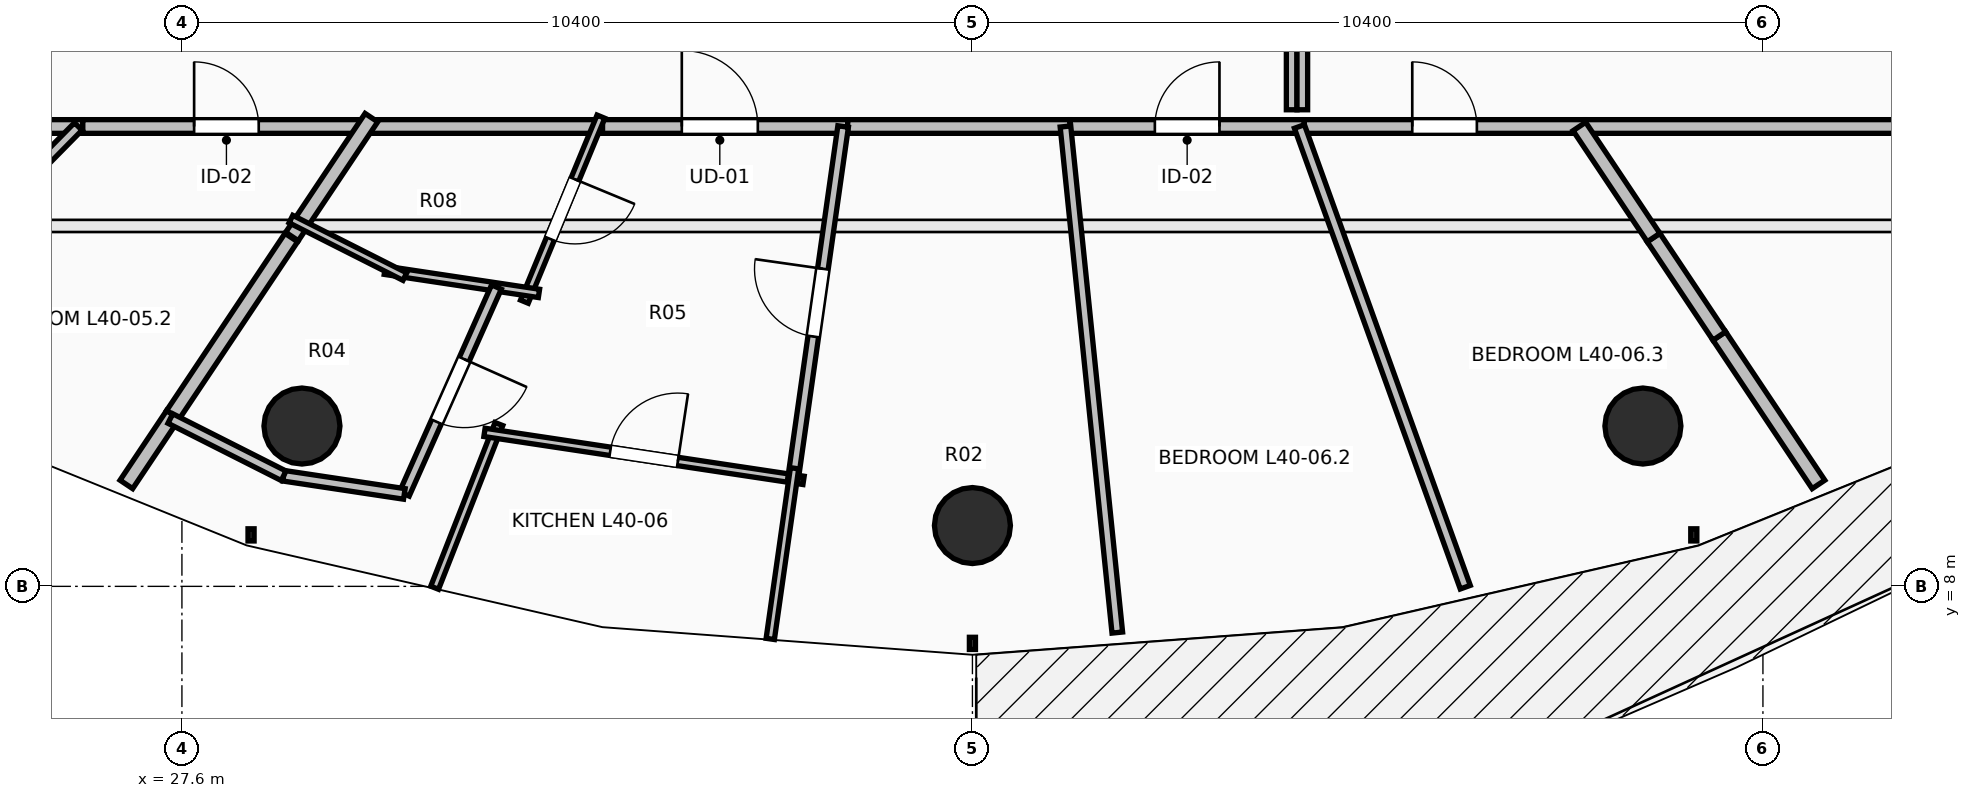
"""IFC4 building model, lengths in metres.
Left out: names, types, materials, properties, quantities, classifications, styles, units other than length and angle.
Written with IfcOpenShell. Run it as: python <this file> out.ifc"""

import sys

from ifc_helpers import new_model, si_unit, direction, frame, frame_2d, origin, origin_2d, place, context, subcontext, project, spatial, rectangle, circle, extrude, element, fill, save


model = new_model("IFC4")
c1 = context("Model", 3, precision=1e-05, world=origin(), true_north=direction((0.0, 1.0)))
c2 = subcontext(c1, "Body", "Model", "MODEL_VIEW")
j1 = project(units=[si_unit("LENGTHUNIT", "METRE"), si_unit("PLANEANGLEUNIT", "RADIAN")], contexts=[c1])
p1 = place(None, origin())
s1 = spatial("IfcSite", under=j1, at=p1, CompositionType="ELEMENT")
p2 = place(p1, origin())
s2 = spatial("IfcBuilding", under=s1, at=p2, CompositionType="ELEMENT")
p3 = place(p2, frame((0.0, 0.0, 150.1)))
s3 = spatial("IfcBuildingStorey", under=s2, at=p3, CompositionType="ELEMENT", Elevation=150.1)
for number, where, z_axis, x_axis in (
    (1, (29.179, 10.109, 0.0), (0.0, 0.0, 1.0), (-0.383, -0.924, 0.0)),
    (2, (38.0, 8.8, 0.0), (0.0, 0.0, 1.0), (0.0, -1.0, 0.0)),
    (3, (46.821, 10.109, 0.0), (0.0, 0.0, 1.0), (0.383, -0.924, 0.0)),
):
    element("IfcColumn", number, at=place(p3, frame(where, z_axis=z_axis, x_axis=x_axis)), inside=s3, PredefinedType="COLUMN", context=c2, shape_type="SweptSolid", body=[
        extrude(circle(Radius=0.5, at=origin_2d()), origin(), (0.0, 0.0, 1.0), 3.5),
    ])
p4 = place(p3, frame((25.2, 14.05, 0.0), z_axis=(0.0, 0.0, 1.0), x_axis=(1.0, 0.0, 0.0)))
e4 = element("IfcWall", 4, at=p4, inside=s3, PredefinedType="PARTITIONING", context=c2, shape_type="SweptSolid", body=[
    extrude(rectangle(XDim=1.096, YDim=0.18, at=frame_2d((0.548, 0.0))), origin(), (0.0, 0.0, 1.0), 2.972),
])
p5 = place(p3, frame((26.296, 14.05, 0.0), z_axis=(0.0, 0.0, 1.0), x_axis=(1.0, 0.0, 0.0)))
e5 = element("IfcWall", 5, at=p5, inside=s3, PredefinedType="PARTITIONING", context=c2, shape_type="SweptSolid", body=[
    extrude(rectangle(XDim=3.779, YDim=0.18, at=frame_2d((1.89, 0.0))), origin(), (0.0, 0.0, 1.0), 2.432),
])
p6 = place(p5, frame((1.465, 0.0, 0.0)))
e6 = element("IfcOpeningElement", 6, at=p6, cuts=e5, PredefinedType="OPENING", context=c2, shape_type="SweptSolid", body=[
    extrude(rectangle(XDim=0.85, YDim=2.1, at=frame_2d((0.425, 1.05))), frame((0.0, 0.105, 0.0), z_axis=(0.0, -1.0, 0.0), x_axis=(1.0, 0.0, 0.0)), (0.0, 0.0, 1.0), 0.21),
])
p7 = place(p3, frame((32.994, 14.05, 0.0), z_axis=(0.0, 0.0, 1.0), x_axis=(1.0, 0.0, 0.0)))
e7 = element("IfcWall", 7, at=p7, inside=s3, PredefinedType="PARTITIONING", context=c2, shape_type="SweptSolid", body=[
    extrude(rectangle(XDim=3.365, YDim=0.18, at=frame_2d((1.683, 0.0))), origin(), (0.0, 0.0, 1.0), 2.886),
])
p8 = place(p7, frame((1.183, 0.0, 0.0)))
e8 = element("IfcOpeningElement", 8, at=p8, cuts=e7, PredefinedType="OPENING", context=c2, shape_type="SweptSolid", body=[
    extrude(rectangle(XDim=1.0, YDim=2.15, at=frame_2d((0.5, 1.075))), frame((0.0, 0.105, 0.0), z_axis=(0.0, -1.0, 0.0), x_axis=(1.0, 0.0, 0.0)), (0.0, 0.0, 1.0), 0.21),
])
p9 = place(p3, frame((29.935, 14.05, 0.0), z_axis=(0.0, 0.0, 1.0), x_axis=(1.0, 0.0, 0.0)))
e9 = element("IfcWall", 9, at=p9, inside=s3, PredefinedType="PARTITIONING", context=c2, shape_type="SweptSolid", body=[
    extrude(rectangle(XDim=3.199, YDim=0.18, at=frame_2d((1.6, 0.0))), origin(), (0.0, 0.0, 1.0), 3.24),
])
p10 = place(p3, frame((36.359, 14.05, 0.0), z_axis=(0.0, 0.0, 1.0), x_axis=(1.0, 0.0, 0.0)))
e10 = element("IfcWall", 10, at=p10, inside=s3, PredefinedType="PARTITIONING", context=c2, shape_type="SweptSolid", body=[
    extrude(rectangle(XDim=2.925, YDim=0.18, at=frame_2d((1.462, 0.0))), origin(), (0.0, 0.0, 1.0), 2.886),
])
p11 = place(p3, frame((39.284, 14.05, 0.0), z_axis=(0.0, 0.0, 1.0), x_axis=(1.0, 0.0, 0.0)))
e11 = element("IfcWall", 11, at=p11, inside=s3, PredefinedType="PARTITIONING", context=c2, shape_type="SweptSolid", body=[
    extrude(rectangle(XDim=3.082, YDim=0.18, at=frame_2d((1.541, 0.0))), origin(), (0.0, 0.0, 1.0), 2.886),
])
p12 = place(p11, frame((1.116, 0.0, 0.0)))
e12 = element("IfcOpeningElement", 12, at=p12, cuts=e11, PredefinedType="OPENING", context=c2, shape_type="SweptSolid", body=[
    extrude(rectangle(XDim=0.85, YDim=2.1, at=frame_2d((0.425, 1.05))), frame((0.0, 0.105, 0.0), z_axis=(0.0, -1.0, 0.0), x_axis=(1.0, 0.0, 0.0)), (0.0, 0.0, 1.0), 0.21),
])
p13 = place(p3, frame((42.366, 14.05, 0.0), z_axis=(0.0, 0.0, 1.0), x_axis=(1.0, 0.0, 0.0)))
e13 = element("IfcWall", 13, at=p13, inside=s3, PredefinedType="PARTITIONING", context=c2, shape_type="SweptSolid", body=[
    extrude(rectangle(XDim=3.691, YDim=0.18, at=frame_2d((1.845, 0.0))), origin(), (0.0, 0.0, 1.0), 2.432),
])
p14 = place(p13, frame((1.42, 0.0, 0.0)))
e14 = element("IfcOpeningElement", 14, at=p14, cuts=e13, PredefinedType="OPENING", context=c2, shape_type="SweptSolid", body=[
    extrude(rectangle(XDim=0.85, YDim=2.1, at=frame_2d((0.425, 1.05))), frame((0.0, 0.105, 0.0), z_axis=(0.0, -1.0, 0.0), x_axis=(1.0, 0.0, 0.0)), (0.0, 0.0, 1.0), 0.21),
])
p15 = place(p3, frame((46.057, 14.05, 0.0), z_axis=(0.0, 0.0, 1.0), x_axis=(1.0, 0.0, 0.0)))
e15 = element("IfcWall", 15, at=p15, inside=s3, PredefinedType="PARTITIONING", context=c2, shape_type="SweptSolid", body=[
    extrude(rectangle(XDim=4.743, YDim=0.18, at=frame_2d((2.372, 0.0))), origin(), (0.0, 0.0, 1.0), 2.432),
])
p16 = place(p3, frame((23.249, 11.015, 0.0), z_axis=(0.0, 0.0, 1.0), x_axis=(0.701437189486, 0.712731274188, 0.0)))
e16 = element("IfcWall", 16, at=p16, inside=s3, PredefinedType="PARTITIONING", context=c2, shape_type="SweptSolid", body=[
    extrude(rectangle(XDim=4.259, YDim=0.14, at=frame_2d((2.129, 0.0))), origin(), (0.0, 0.0, 1.0), 2.728),
])
p17 = place(p3, frame((26.869, 9.341, 0.0), z_axis=(0.0, 0.0, 1.0), x_axis=(0.555772359104, 0.831334520428, 0.0)))
e17 = element("IfcWall", 17, at=p17, inside=s3, PredefinedType="PARTITIONING", context=c2, shape_type="SweptSolid", body=[
    extrude(rectangle(XDim=1.103, YDim=0.2, at=frame_2d((0.552, 0.0))), origin(), (0.0, 0.0, 1.0), 3.24),
])
p18 = place(p3, frame((29.048, 12.603, 0.0), z_axis=(0.0, 0.0, 1.0), x_axis=(0.555448864434, 0.831550695387, 0.0)))
e18 = element("IfcWall", 18, at=p18, inside=s3, PredefinedType="PARTITIONING", context=c2, shape_type="SweptSolid", body=[
    extrude(rectangle(XDim=1.881, YDim=0.2, at=frame_2d((0.94, 0.0))), origin(), (0.0, 0.0, 1.0), 2.886),
])
p19 = place(p3, frame((27.482, 10.258, 0.0), z_axis=(0.0, 0.0, 1.0), x_axis=(0.5554636799, 0.831540798946, 0.0)))
e19 = element("IfcWall", 19, at=p19, inside=s3, PredefinedType="PARTITIONING", context=c2, shape_type="SweptSolid", body=[
    extrude(rectangle(XDim=2.803, YDim=0.2, at=frame_2d((1.402, 0.0))), origin(), (0.0, 0.0, 1.0), 2.432),
])
p20 = place(p3, frame((33.113, 14.179, 0.0), z_axis=(0.0, 0.0, 1.0), x_axis=(-0.382343605935, -0.924020220017, 0.0)))
e20 = element("IfcWall", 20, at=p20, inside=s3, PredefinedType="PARTITIONING", context=c2, shape_type="SweptSolid", body=[
    extrude(rectangle(XDim=2.634, YDim=0.11, at=frame_2d((1.317, 0.0))), origin(), (0.0, 0.0, 1.0), 2.886),
])
p21 = place(p20, frame((0.892, 0.0, 0.0)))
e21 = element("IfcOpeningElement", 21, at=p21, cuts=e20, PredefinedType="OPENING", context=c2, shape_type="SweptSolid", body=[
    extrude(rectangle(XDim=0.85, YDim=2.1, at=frame_2d((0.425, 1.05))), frame((0.0, 0.07, 0.0), z_axis=(0.0, -1.0, 0.0), x_axis=(1.0, 0.0, 0.0)), (0.0, 0.0, 1.0), 0.14),
])
p22 = place(p3, frame((32.297, 11.854, 0.0), z_axis=(0.0, 0.0, 1.0), x_axis=(-0.988917131865, 0.148468536412, 0.0)))
e22 = element("IfcWall", 22, at=p22, inside=s3, PredefinedType="PARTITIONING", context=c2, shape_type="SweptSolid", body=[
    extrude(rectangle(XDim=2.051, YDim=0.11, at=frame_2d((1.025, 0.0))), origin(), (0.0, 0.0, 1.0), 3.24),
])
p23 = place(p3, frame((30.925, 7.982, 0.0), z_axis=(0.0, 0.0, 1.0), x_axis=(0.365433616255, 0.930837403691, 0.0)))
e23 = element("IfcWall", 23, at=p23, inside=s3, PredefinedType="PARTITIONING", context=c2, shape_type="SweptSolid", body=[
    extrude(rectangle(XDim=2.313, YDim=0.11, at=frame_2d((1.157, 0.0))), origin(), (0.0, 0.0, 1.0), 2.728),
])
p24 = place(p3, frame((31.581, 10.026, 0.0), z_axis=(0.0, 0.0, 1.0), x_axis=(0.988869600434, -0.148784788666, 0.0)))
e24 = element("IfcWall", 24, at=p24, inside=s3, PredefinedType="PARTITIONING", context=c2, shape_type="SweptSolid", body=[
    extrude(rectangle(XDim=4.245, YDim=0.11, at=frame_2d((2.123, 0.0))), origin(), (0.0, 0.0, 1.0), 3.24),
])
p25 = place(p24, frame((1.673, 0.0, 0.0)))
e25 = element("IfcOpeningElement", 25, at=p25, cuts=e24, PredefinedType="OPENING", context=c2, shape_type="SweptSolid", body=[
    extrude(rectangle(XDim=0.9, YDim=2.1, at=frame_2d((0.45, 1.05))), frame((0.0, 0.07, 0.0), z_axis=(0.0, -1.0, 0.0), x_axis=(1.0, 0.0, 0.0)), (0.0, 0.0, 1.0), 0.14),
])
p26 = place(p3, frame((31.738, 11.938, 0.0), z_axis=(0.0, 0.0, 1.0), x_axis=(-0.406814964782, -0.913510582549, 0.0)))
e26 = element("IfcWall", 26, at=p26, inside=s3, PredefinedType="PARTITIONING", context=c2, shape_type="SweptSolid", body=[
    extrude(rectangle(XDim=2.98, YDim=0.14, at=frame_2d((1.49, 0.0))), origin(), (0.0, 0.0, 1.0), 2.728),
])
p27 = place(p26, frame((1.04, 0.0, 0.0)))
e27 = element("IfcOpeningElement", 27, at=p27, cuts=e26, PredefinedType="OPENING", context=c2, shape_type="SweptSolid", body=[
    extrude(rectangle(XDim=0.9, YDim=2.1, at=frame_2d((0.45, 1.05))), frame((0.0, 0.085, 0.0), z_axis=(0.0, -1.0, 0.0), x_axis=(1.0, 0.0, 0.0)), (0.0, 0.0, 1.0), 0.17),
])
p28 = place(p3, frame((30.526, 9.216, 0.0), z_axis=(0.0, 0.0, 1.0), x_axis=(-0.988860390109, 0.148845990455, 0.0)))
e28 = element("IfcWall", 28, at=p28, inside=s3, PredefinedType="PARTITIONING", context=c2, shape_type="SweptSolid", body=[
    extrude(rectangle(XDim=1.606, YDim=0.14, at=frame_2d((0.803, 0.0))), origin(), (0.0, 0.0, 1.0), 3.24),
])
p29 = place(p3, frame((28.938, 9.455, 0.0), z_axis=(0.0, 0.0, 1.0), x_axis=(-0.892517956507, 0.451011859392, 0.0)))
e29 = element("IfcWall", 29, at=p29, inside=s3, PredefinedType="PARTITIONING", context=c2, shape_type="SweptSolid", body=[
    extrude(rectangle(XDim=1.669, YDim=0.14, at=frame_2d((0.835, 0.0))), origin(), (0.0, 0.0, 1.0), 3.24),
])
p30 = place(p3, frame((35.64, 9.415, 0.0), z_axis=(0.0, 0.0, 1.0), x_axis=(0.140800762129, 0.990037951487, 0.0)))
e30 = element("IfcWall", 30, at=p30, inside=s3, PredefinedType="PARTITIONING", context=c2, shape_type="SweptSolid", body=[
    extrude(rectangle(XDim=4.682, YDim=0.14, at=frame_2d((2.341, 0.0))), origin(), (0.0, 0.0, 1.0), 2.886),
])
p31 = place(p30, frame((1.891, 0.0, 0.0)))
e31 = element("IfcOpeningElement", 31, at=p31, cuts=e30, PredefinedType="OPENING", context=c2, shape_type="SweptSolid", body=[
    extrude(rectangle(XDim=0.9, YDim=2.1, at=frame_2d((0.45, 1.05))), frame((0.0, 0.085, 0.0), z_axis=(0.0, -1.0, 0.0), x_axis=(1.0, 0.0, 0.0)), (0.0, 0.0, 1.0), 0.17),
])
p32 = place(p3, frame((29.034, 12.832, 0.0), z_axis=(0.0, 0.0, 1.0), x_axis=(0.892617244745, -0.450815321816, 0.0)))
e32 = element("IfcWall", 32, at=p32, inside=s3, PredefinedType="PARTITIONING", context=c2, shape_type="SweptSolid", body=[
    extrude(rectangle(XDim=1.679, YDim=0.11, at=frame_2d((0.84, 0.0))), origin(), (0.0, 0.0, 1.0), 2.972),
])
p33 = place(p3, frame((35.34, 7.308, 0.0), z_axis=(0.0, 0.0, 1.0), x_axis=(0.140803429846, 0.990037572087, 0.0)))
e33 = element("IfcWall", 33, at=p33, inside=s3, PredefinedType="PARTITIONING", context=c2, shape_type="SweptSolid", body=[
    extrude(rectangle(XDim=2.268, YDim=0.11, at=frame_2d((1.134, 0.0))), origin(), (0.0, 0.0, 1.0), 2.728),
])
p34 = place(p3, frame((39.906, 7.392, 0.0), z_axis=(0.0, 0.0, 1.0), x_axis=(-0.101883545041, 0.994796332547, 0.0)))
e34 = element("IfcWall", 34, at=p34, inside=s3, PredefinedType="PARTITIONING", context=c2, shape_type="SweptSolid", body=[
    extrude(rectangle(XDim=6.693, YDim=0.14, at=frame_2d((3.346, 0.0))), origin(), (0.0, 0.0, 1.0), 2.432),
])
p35 = place(p3, frame((44.484, 7.989, 0.0), z_axis=(0.0, 0.0, 1.0), x_axis=(-0.338707389808, 0.940891760028, 0.0)))
e35 = element("IfcWall", 35, at=p35, inside=s3, PredefinedType="PARTITIONING", context=c2, shape_type="SweptSolid", body=[
    extrude(rectangle(XDim=6.442, YDim=0.14, at=frame_2d((3.221, 0.0))), origin(), (0.0, 0.0, 1.0), 2.432),
])
p36 = place(p3, frame((49.131, 9.341, 0.0), z_axis=(0.0, 0.0, 1.0), x_axis=(-0.555659266741, 0.831410114976, 0.0)))
e36 = element("IfcWall", 36, at=p36, inside=s3, PredefinedType="PARTITIONING", context=c2, shape_type="SweptSolid", body=[
    extrude(rectangle(XDim=2.349, YDim=0.2, at=frame_2d((1.174, 0.0))), origin(), (0.0, 0.0, 1.0), 2.728),
])
p37 = place(p3, frame((47.826, 11.294, 0.0), z_axis=(0.0, 0.0, 1.0), x_axis=(-0.55538732275, 0.831591799941, 0.0)))
e37 = element("IfcWall", 37, at=p37, inside=s3, PredefinedType="PARTITIONING", context=c2, shape_type="SweptSolid", body=[
    extrude(rectangle(XDim=1.557, YDim=0.2, at=frame_2d((0.779, 0.0))), origin(), (0.0, 0.0, 1.0), 2.432),
])
p38 = place(p3, frame((46.961, 12.589, 0.0), z_axis=(0.0, 0.0, 1.0), x_axis=(-0.555437554373, 0.83155825003, 0.0)))
e38 = element("IfcWall", 38, at=p38, inside=s3, PredefinedType="PARTITIONING", context=c2, shape_type="SweptSolid", body=[
    extrude(rectangle(XDim=1.757, YDim=0.2, at=frame_2d((0.878, 0.0))), origin(), (0.0, 0.0, 1.0), 2.886),
])
for number, where, z_axis, x_axis in (
    (39, (42.2, 16.1, 0.0), (0.0, 0.0, 1.0), (0.0, -1.0, 0.0)),
    (40, (42.34, 14.27, 0.0), (0.0, 0.0, 1.0), (0.0, 1.0, 0.0)),
):
    element("IfcWall", number, at=place(p3, frame(where, z_axis=z_axis, x_axis=x_axis)), inside=s3, PredefinedType="PARTITIONING", context=c2, shape_type="SweptSolid", body=[
        extrude(rectangle(XDim=1.83, YDim=0.14, at=frame_2d((0.915, 0.0))), origin(), (0.0, 0.0, 1.0), 2.886),
    ])
p39 = place(p8, origin())
e41 = element("IfcDoor", 41, at=p39, inside=s3, OperationType="SINGLE_SWING_LEFT", PredefinedType="DOOR", context=c2, shape_type="SweptSolid", body=[
    extrude(rectangle(XDim=1.0, YDim=2.15, at=frame_2d((0.5, 1.075))), frame((0.0, 0.025, 0.0), z_axis=(0.0, -1.0, 0.0), x_axis=(1.0, 0.0, 0.0)), (0.0, 0.0, 1.0), 0.05),
])
fill(e8, e41)
p40 = place(p21, origin())
e42 = element("IfcDoor", 42, at=p40, inside=s3, OperationType="SINGLE_SWING_LEFT", PredefinedType="DOOR", context=c2, shape_type="SweptSolid", body=[
    extrude(rectangle(XDim=0.85, YDim=2.1, at=frame_2d((0.425, 1.05))), frame((0.0, 0.025, 0.0), z_axis=(0.0, -1.0, 0.0), x_axis=(1.0, 0.0, 0.0)), (0.0, 0.0, 1.0), 0.05),
])
fill(e21, e42)
p41 = place(p25, origin())
e43 = element("IfcDoor", 43, at=p41, inside=s3, OperationType="SINGLE_SWING_RIGHT", PredefinedType="DOOR", context=c2, shape_type="SweptSolid", body=[
    extrude(rectangle(XDim=0.9, YDim=2.1, at=frame_2d((0.45, 1.05))), frame((0.0, 0.025, 0.0), z_axis=(0.0, -1.0, 0.0), x_axis=(1.0, 0.0, 0.0)), (0.0, 0.0, 1.0), 0.05),
])
fill(e25, e43)
p42 = place(p27, origin())
e44 = element("IfcDoor", 44, at=p42, inside=s3, OperationType="SINGLE_SWING_LEFT", PredefinedType="DOOR", context=c2, shape_type="SweptSolid", body=[
    extrude(rectangle(XDim=0.9, YDim=2.1, at=frame_2d((0.45, 1.05))), frame((0.0, 0.025, 0.0), z_axis=(0.0, -1.0, 0.0), x_axis=(1.0, 0.0, 0.0)), (0.0, 0.0, 1.0), 0.05),
])
fill(e27, e44)
p43 = place(p31, origin())
e45 = element("IfcDoor", 45, at=p43, inside=s3, OperationType="SINGLE_SWING_RIGHT", PredefinedType="DOOR", context=c2, shape_type="SweptSolid", body=[
    extrude(rectangle(XDim=0.9, YDim=2.1, at=frame_2d((0.45, 1.05))), frame((0.0, 0.025, 0.0), z_axis=(0.0, -1.0, 0.0), x_axis=(1.0, 0.0, 0.0)), (0.0, 0.0, 1.0), 0.05),
])
fill(e31, e45)
p44 = place(p6, origin())
e46 = element("IfcDoor", 46, at=p44, inside=s3, OperationType="SINGLE_SWING_LEFT", PredefinedType="DOOR", context=c2, shape_type="SweptSolid", body=[
    extrude(rectangle(XDim=0.85, YDim=2.1, at=frame_2d((0.425, 1.05))), frame((0.0, 0.025, 0.0), z_axis=(0.0, -1.0, 0.0), x_axis=(1.0, 0.0, 0.0)), (0.0, 0.0, 1.0), 0.05),
])
fill(e6, e46)
p45 = place(p12, origin())
e47 = element("IfcDoor", 47, at=p45, inside=s3, OperationType="SINGLE_SWING_RIGHT", PredefinedType="DOOR", context=c2, shape_type="SweptSolid", body=[
    extrude(rectangle(XDim=0.85, YDim=2.1, at=frame_2d((0.425, 1.05))), frame((0.0, 0.025, 0.0), z_axis=(0.0, -1.0, 0.0), x_axis=(1.0, 0.0, 0.0)), (0.0, 0.0, 1.0), 0.05),
])
fill(e12, e47)
p46 = place(p14, origin())
e48 = element("IfcDoor", 48, at=p46, inside=s3, OperationType="SINGLE_SWING_LEFT", PredefinedType="DOOR", context=c2, shape_type="SweptSolid", body=[
    extrude(rectangle(XDim=0.85, YDim=2.1, at=frame_2d((0.425, 1.05))), frame((0.0, 0.025, 0.0), z_axis=(0.0, -1.0, 0.0), x_axis=(1.0, 0.0, 0.0)), (0.0, 0.0, 1.0), 0.05),
])
fill(e14, e48)
save(model, sys.argv[1])
